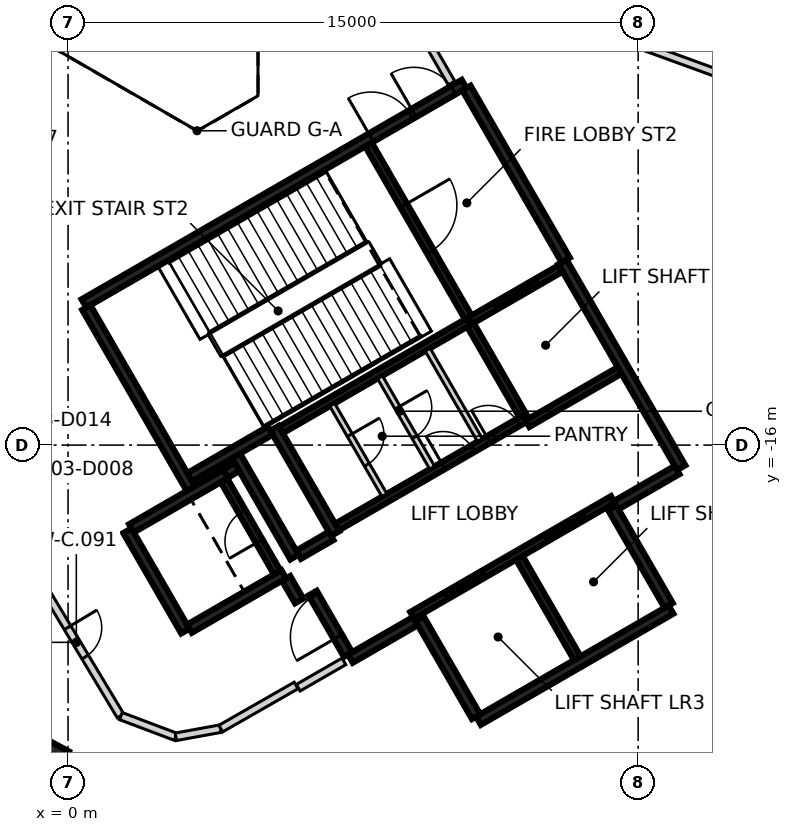
"""IFC4 building model, lengths in metres.
Left out: names, types, materials, properties, quantities, classifications, styles, units other than length and angle.
Written with IfcOpenShell. Run it as: python <this file> out.ifc"""

import sys

from ifc_helpers import new_model, si_unit, direction, frame, frame_2d, origin, origin_2d, place, context, subcontext, project, spatial, rectangle, extrude, element, fill, save


model = new_model("IFC4")
c1 = context("Model", 3, precision=1e-05, world=origin(), true_north=direction((0.0, 1.0)))
c2 = subcontext(c1, "Body", "Model", "MODEL_VIEW")
j1 = project(units=[si_unit("LENGTHUNIT", "METRE"), si_unit("PLANEANGLEUNIT", "RADIAN")], contexts=[c1])
p1 = place(None, origin())
s1 = spatial("IfcSite", under=j1, at=p1, CompositionType="ELEMENT")
p2 = place(p1, origin())
s2 = spatial("IfcBuilding", under=s1, at=p2, CompositionType="ELEMENT")
p3 = place(p2, frame((0.0, 0.0, 19.5)))
s3 = spatial("IfcBuildingStorey", under=s2, at=p3, CompositionType="ELEMENT", Elevation=19.5)
p4 = place(p3, frame((-1.197, -24.423, -0.35), z_axis=(0.0, 0.0, 1.0), x_axis=(0.476198301069, 0.879337920289, 0.0)))
e1 = element("IfcColumn", 1, at=p4, inside=s3, PredefinedType="COLUMN", context=c2, shape_type="SweptSolid", body=[
    extrude(rectangle(XDim=1.8, YDim=1.8, at=origin_2d()), origin(), (0.0, 0.0, 1.0), 2.5),
])
p5 = place(p3, frame((0.417, -12.273, 0.0), z_axis=(0.0, 0.0, 1.0), x_axis=(0.866021906294, 0.500006057782, 0.0)))
e2 = element("IfcWall", 2, at=p5, inside=s3, PredefinedType="SHEAR", context=c2, shape_type="SweptSolid", body=[
    extrude(rectangle(XDim=11.55, YDim=0.25, at=frame_2d((5.775, 0.0))), origin(), (0.0, 0.0, 1.0), 4.55),
])
p6 = place(p5, frame((10.025, 0.0, 0.0)))
e3 = element("IfcOpeningElement", 3, at=p6, cuts=e2, PredefinedType="OPENING", context=c2, shape_type="SweptSolid", body=[
    extrude(rectangle(XDim=1.2, YDim=2.1, at=frame_2d((0.6, 1.05))), frame((0.0, 0.135, 0.0), z_axis=(0.0, -1.0, 0.0), x_axis=(1.0, 0.0, 0.0)), (0.0, 0.0, 1.0), 0.27),
])
p7 = place(p5, frame((8.725, 0.0, 0.0)))
e4 = element("IfcOpeningElement", 4, at=p7, cuts=e2, PredefinedType="OPENING", context=c2, shape_type="SweptSolid", body=[
    extrude(rectangle(XDim=1.2, YDim=2.1, at=frame_2d((0.6, 1.05))), frame((0.0, 0.135, 0.0), z_axis=(0.0, -1.0, 0.0), x_axis=(1.0, 0.0, 0.0)), (0.0, 0.0, 1.0), 0.27),
])
p8 = place(p3, frame((13.008, -11.181, 0.0), z_axis=(0.0, 0.0, 1.0), x_axis=(0.500004234368, -0.866022959057, 0.0)))
e5 = element("IfcWall", 5, at=p8, inside=s3, PredefinedType="SHEAR", context=c2, shape_type="SweptSolid", body=[
    extrude(rectangle(XDim=6.25, YDim=0.25, at=frame_2d((3.125, 0.0))), origin(), (0.0, 0.0, 1.0), 4.55),
])
p9 = place(p3, frame((15.865, -20.328, 0.0), z_axis=(0.0, 0.0, 1.0), x_axis=(-0.86602852612, -0.499994591916, 0.0)))
e6 = element("IfcWall", 6, at=p9, inside=s3, PredefinedType="SHEAR", context=c2, shape_type="SweptSolid", body=[
    extrude(rectangle(XDim=5.85, YDim=0.25, at=frame_2d((2.925, 0.0))), origin(), (0.0, 0.0, 1.0), 4.55),
])
p10 = place(p3, frame((3.235, -17.153, 0.0), z_axis=(0.0, 0.0, 1.0), x_axis=(-0.500008851346, 0.866020293397, 0.0)))
e7 = element("IfcWall", 7, at=p10, inside=s3, PredefinedType="SHEAR", context=c2, shape_type="SweptSolid", body=[
    extrude(rectangle(XDim=5.51, YDim=0.25, at=frame_2d((2.755, 0.0))), origin(), (0.0, 0.0, 1.0), 4.55),
])
p11 = place(p3, frame((10.483, -6.606, 0.0), z_axis=(0.0, 0.0, 1.0), x_axis=(0.49999885962, -0.866026062182, 0.0)))
e8 = element("IfcWall", 8, at=p11, inside=s3, PredefinedType="SHEAR", context=c2, shape_type="SweptSolid", body=[
    extrude(rectangle(XDim=5.225, YDim=0.25, at=frame_2d((2.612, 0.0))), origin(), (0.0, 0.0, 1.0), 4.55),
])
p12 = place(p3, frame((7.031, -18.327, 0.0), z_axis=(0.0, 0.0, 1.0), x_axis=(-0.499971222258, 0.866042017984, 0.0)))
e9 = element("IfcWall", 9, at=p12, inside=s3, PredefinedType="SHEAR", context=c2, shape_type="SweptSolid", body=[
    extrude(rectangle(XDim=3.2, YDim=0.25, at=frame_2d((1.6, 0.0))), origin(), (0.0, 0.0, 1.0), 4.55),
])
for number, where, z_axis, x_axis in (
    (10, (14.315, -17.644, 0.0), (0.0, 0.0, 1.0), (0.5, -0.866, 0.0)),
    (11, (10.736, -23.145, 0.0), (0.0, 0.0, 1.0), (-0.5, 0.866, 0.0)),
):
    element("IfcWall", number, at=place(p3, frame(where, z_axis=z_axis, x_axis=x_axis)), inside=s3, PredefinedType="SHEAR", context=c2, shape_type="SweptSolid", body=[
        extrude(rectangle(XDim=2.974, YDim=0.25, at=frame_2d((1.487, 0.0))), origin(), (0.0, 0.0, 1.0), 4.55),
    ])
p13 = place(p3, frame((3.085, -20.894, 0.0), z_axis=(0.0, 0.0, 1.0), x_axis=(-0.499978833458, 0.866037623948, 0.0)))
e12 = element("IfcWall", 12, at=p13, inside=s3, PredefinedType="SHEAR", context=c2, shape_type="SweptSolid", body=[
    extrude(rectangle(XDim=3.05, YDim=0.25, at=frame_2d((1.525, 0.0))), origin(), (0.0, 0.0, 1.0), 4.55),
])
p14 = place(p3, frame((1.669, -18.19, 0.0), z_axis=(0.0, 0.0, 1.0), x_axis=(0.866042235819, 0.499970844928, 0.0)))
e13 = element("IfcWall", 13, at=p14, inside=s3, PredefinedType="SHEAR", context=c2, shape_type="SweptSolid", body=[
    extrude(rectangle(XDim=2.865, YDim=0.25, at=frame_2d((1.432, 0.0))), origin(), (0.0, 0.0, 1.0), 4.55),
])
p15 = place(p3, frame((5.675, -19.399, 0.0), z_axis=(0.0, 0.0, 1.0), x_axis=(-0.866026637627, -0.499997862916, 0.0)))
e14 = element("IfcWall", 14, at=p15, inside=s3, PredefinedType="SHEAR", context=c2, shape_type="SweptSolid", body=[
    extrude(rectangle(XDim=2.865, YDim=0.25, at=frame_2d((1.432, 0.0))), origin(), (0.0, 0.0, 1.0), 4.55),
])
p16 = place(p3, frame((4.414, -16.276, 0.0), z_axis=(0.0, 0.0, 1.0), x_axis=(0.500003324108, -0.866023484601, 0.0)))
e15 = element("IfcWall", 15, at=p16, inside=s3, PredefinedType="SHEAR", context=c2, shape_type="SweptSolid", body=[
    extrude(rectangle(XDim=3.085, YDim=0.25, at=frame_2d((1.542, 0.0))), origin(), (0.0, 0.0, 1.0), 4.55),
])
p17 = place(p3, frame((5.322, -15.619, 0.0), z_axis=(0.0, 0.0, 1.0), x_axis=(-0.866026229868, -0.499998569178, 0.0)))
e16 = element("IfcWall", 16, at=p17, inside=s3, PredefinedType="SHEAR", context=c2, shape_type="SweptSolid", body=[
    extrude(rectangle(XDim=2.449, YDim=0.25, at=frame_2d((1.225, 0.0))), origin(), (0.0, 0.0, 1.0), 4.55),
])
p18 = place(p3, frame((9.14, -20.631, 0.0), z_axis=(0.0, 0.0, 1.0), x_axis=(-0.866043531843, -0.499968599967, 0.0)))
e17 = element("IfcWall", 17, at=p18, inside=s3, PredefinedType="SHEAR", context=c2, shape_type="SweptSolid", body=[
    extrude(rectangle(XDim=1.975, YDim=0.25, at=frame_2d((0.987, 0.0))), origin(), (0.0, 0.0, 1.0), 4.55),
])
p19 = place(p3, frame((16.025, -16.656, 0.0), z_axis=(0.0, 0.0, 1.0), x_axis=(-0.866016279763, -0.500015802937, 0.0)))
e18 = element("IfcWall", 18, at=p19, inside=s3, PredefinedType="SHEAR", context=c2, shape_type="SweptSolid", body=[
    extrude(rectangle(XDim=1.849, YDim=0.25, at=frame_2d((0.925, 0.0))), origin(), (0.0, 0.0, 1.0), 4.55),
])
p20 = place(p3, frame((7.367, -21.51, 0.0), z_axis=(0.0, 0.0, 1.0), x_axis=(-0.499983108224, 0.866035156036, 0.0)))
e19 = element("IfcWall", 19, at=p20, inside=s3, PredefinedType="SHEAR", context=c2, shape_type="SweptSolid", body=[
    extrude(rectangle(XDim=1.865, YDim=0.25, at=frame_2d((0.932, 0.0))), origin(), (0.0, 0.0, 1.0), 4.55),
])
p21 = place(p20, frame((0.535, 0.0, 0.0)))
e20 = element("IfcOpeningElement", 20, at=p21, cuts=e19, PredefinedType="OPENING", context=c2, shape_type="SweptSolid", body=[
    extrude(rectangle(XDim=1.25, YDim=2.1, at=frame_2d((0.625, 1.05))), frame((0.0, 0.135, 0.0), z_axis=(0.0, -1.0, 0.0), x_axis=(1.0, 0.0, 0.0)), (0.0, 0.0, 1.0), 0.27),
])
p22 = place(p3, frame((6.065, -18.885, 0.0), z_axis=(0.0, 0.0, 1.0), x_axis=(0.866017078145, 0.500014420154, 0.0)))
e21 = element("IfcWall", 21, at=p22, inside=s3, PredefinedType="SHEAR", context=c2, shape_type="SweptSolid", body=[
    extrude(rectangle(XDim=0.989, YDim=0.25, at=frame_2d((0.495, 0.0))), origin(), (0.0, 0.0, 1.0), 4.55),
])
p23 = place(p3, frame((6.08, -20.1, 0.0), z_axis=(0.0, 0.0, 1.0), x_axis=(-0.500051773299, 0.865995510393, 0.0)))
e22 = element("IfcWall", 22, at=p23, inside=s3, PredefinedType="SHEAR", context=c2, shape_type="SweptSolid", body=[
    extrude(rectangle(XDim=0.685, YDim=0.25, at=frame_2d((0.342, 0.0))), origin(), (0.0, 0.0, 1.0), 4.55),
])
p24 = place(p3, frame((4.145, -16.749, 0.0), z_axis=(0.0, 0.0, 1.0), x_axis=(0.866185586049, 0.49972245349, 0.0)))
e23 = element("IfcWall", 23, at=p24, inside=s3, PredefinedType="SHEAR", context=c2, shape_type="SweptSolid", body=[
    extrude(rectangle(XDim=0.344, YDim=0.25, at=frame_2d((0.172, 0.0))), origin(), (0.0, 0.0, 1.0), 4.55),
])
p25 = place(p3, frame((9.052, -20.48, 0.0), z_axis=(0.0, 0.0, 1.0), x_axis=(0.866030299012, 0.499991521122, 0.0)))
e24 = element("IfcWall", 24, at=p25, inside=s3, PredefinedType="SHEAR", context=c2, shape_type="SweptSolid", body=[
    extrude(rectangle(XDim=6.1, YDim=0.2, at=frame_2d((3.05, 0.0))), origin(), (0.0, 0.0, 1.0), 4.55),
])
p26 = place(p25, frame((1.0, 0.0, 0.0)))
e25 = element("IfcOpeningElement", 25, at=p26, cuts=e24, PredefinedType="OPENING", context=c2, shape_type="SweptSolid", body=[
    extrude(rectangle(XDim=1.2, YDim=2.1, at=frame_2d((0.6, 1.05))), frame((0.0, 0.11, 0.0), z_axis=(0.0, -1.0, 0.0), x_axis=(1.0, 0.0, 0.0)), (0.0, 0.0, 1.0), 0.22),
])
p27 = place(p25, frame((4.05, 0.0, 0.0)))
e26 = element("IfcOpeningElement", 26, at=p27, cuts=e24, PredefinedType="OPENING", context=c2, shape_type="SweptSolid", body=[
    extrude(rectangle(XDim=1.2, YDim=2.1, at=frame_2d((0.6, 1.05))), frame((0.0, 0.11, 0.0), z_axis=(0.0, -1.0, 0.0), x_axis=(1.0, 0.0, 0.0)), (0.0, 0.0, 1.0), 0.22),
])
p28 = place(p3, frame((10.538, -12.752, 0.0), z_axis=(0.0, 0.0, 1.0), x_axis=(-0.866038630372, -0.499977090179, 0.0)))
e27 = element("IfcWall", 27, at=p28, inside=s3, PredefinedType="SHEAR", context=c2, shape_type="SweptSolid", body=[
    extrude(rectangle(XDim=5.699, YDim=0.2, at=frame_2d((2.85, 0.0))), origin(), (0.0, 0.0, 1.0), 4.55),
])
p29 = place(p3, frame((7.077, -18.156, 0.0), z_axis=(0.0, 0.0, 1.0), x_axis=(0.866038630372, 0.499977090179, 0.0)))
e28 = element("IfcWall", 28, at=p29, inside=s3, PredefinedType="SHEAR", context=c2, shape_type="SweptSolid", body=[
    extrude(rectangle(XDim=5.699, YDim=0.2, at=frame_2d((2.85, 0.0))), origin(), (0.0, 0.0, 1.0), 4.55),
])
p30 = place(p29, frame((3.224, 0.0, 0.0)))
e29 = element("IfcOpeningElement", 29, at=p30, cuts=e28, PredefinedType="OPENING", context=c2, shape_type="SweptSolid", body=[
    extrude(rectangle(XDim=0.9, YDim=2.1, at=frame_2d((0.45, 1.05))), frame((0.0, 0.11, 0.0), z_axis=(0.0, -1.0, 0.0), x_axis=(1.0, 0.0, 0.0)), (0.0, 0.0, 1.0), 0.22),
])
p31 = place(p29, frame((4.599, 0.0, 0.0)))
e30 = element("IfcOpeningElement", 30, at=p31, cuts=e28, PredefinedType="OPENING", context=c2, shape_type="SweptSolid", body=[
    extrude(rectangle(XDim=0.9, YDim=2.1, at=frame_2d((0.45, 1.05))), frame((0.0, 0.11, 0.0), z_axis=(0.0, -1.0, 0.0), x_axis=(1.0, 0.0, 0.0)), (0.0, 0.0, 1.0), 0.22),
])
p32 = place(p3, frame((7.906, -8.094, 0.0), z_axis=(0.0, 0.0, 1.0), x_axis=(0.500024287448, -0.866011380966, 0.0)))
e31 = element("IfcWall", 31, at=p32, inside=s3, PredefinedType="SHEAR", context=c2, shape_type="SweptSolid", body=[
    extrude(rectangle(XDim=5.251, YDim=0.2, at=frame_2d((2.625, 0.0))), origin(), (0.0, 0.0, 1.0), 4.55),
])
p33 = place(p32, frame((1.849, 0.0, 0.0)))
e32 = element("IfcOpeningElement", 32, at=p33, cuts=e31, PredefinedType="OPENING", context=c2, shape_type="SweptSolid", body=[
    extrude(rectangle(XDim=1.4, YDim=2.1, at=frame_2d((0.7, 1.05))), frame((0.0, 0.11, 0.0), z_axis=(0.0, -1.0, 0.0), x_axis=(1.0, 0.0, 0.0)), (0.0, 0.0, 1.0), 0.22),
])
p34 = place(p3, frame((11.875, -18.967, 0.0), z_axis=(0.0, 0.0, 1.0), x_axis=(0.49998131003, -0.866036194175, 0.0)))
e33 = element("IfcWall", 33, at=p34, inside=s3, PredefinedType="SHEAR", context=c2, shape_type="SweptSolid", body=[
    extrude(rectangle(XDim=3.048, YDim=0.2, at=frame_2d((1.524, 0.0))), origin(), (0.0, 0.0, 1.0), 4.55),
])
p35 = place(p3, frame((5.503, -19.352, 0.0), z_axis=(0.0, 0.0, 1.0), x_axis=(-0.499986818241, 0.866033014143, 0.0)))
e34 = element("IfcWall", 34, at=p35, inside=s3, PredefinedType="SHEAR", context=c2, shape_type="SweptSolid", body=[
    extrude(rectangle(XDim=2.798, YDim=0.2, at=frame_2d((1.399, 0.0))), origin(), (0.0, 0.0, 1.0), 4.55),
])
p36 = place(p35, frame((0.949, 0.0, 0.0)))
e35 = element("IfcOpeningElement", 35, at=p36, cuts=e34, PredefinedType="OPENING", context=c2, shape_type="SweptSolid", body=[
    extrude(rectangle(XDim=0.9, YDim=2.1, at=frame_2d((0.45, 1.05))), frame((0.0, 0.11, 0.0), z_axis=(0.0, -1.0, 0.0), x_axis=(1.0, 0.0, 0.0)), (0.0, 0.0, 1.0), 0.22),
])
p37 = place(p3, frame((11.963, -15.22, 0.0), z_axis=(0.0, 0.0, 1.0), x_axis=(-0.500034990121, 0.866005201286, 0.0)))
e36 = element("IfcWall", 36, at=p37, inside=s3, PredefinedType="SHEAR", context=c2, shape_type="SweptSolid", body=[
    extrude(rectangle(XDim=2.75, YDim=0.2, at=frame_2d((1.375, 0.0))), origin(), (0.0, 0.0, 1.0), 4.55),
])
p38 = place(p3, frame((10.587, -12.723, 0.0), z_axis=(0.0, 0.0, 1.0), x_axis=(0.866037306777, 0.499979382845, 0.0)))
e37 = element("IfcWall", 37, at=p38, inside=s3, PredefinedType="SHEAR", context=c2, shape_type="SweptSolid", body=[
    extrude(rectangle(XDim=2.742, YDim=0.2, at=frame_2d((1.371, 0.0))), origin(), (0.0, 0.0, 1.0), 4.55),
])
p39 = place(p38, frame((0.743, 0.0, 0.0)))
e38 = element("IfcOpeningElement", 38, at=p39, cuts=e37, PredefinedType="OPENING", context=c2, shape_type="SweptSolid", body=[
    extrude(rectangle(XDim=1.3, YDim=2.1, at=frame_2d((0.65, 1.05))), frame((0.0, 0.11, 0.0), z_axis=(0.0, -1.0, 0.0), x_axis=(1.0, 0.0, 0.0)), (0.0, 0.0, 1.0), 0.22),
])
p40 = place(p3, frame((14.512, -14.037, 0.0), z_axis=(0.0, 0.0, 1.0), x_axis=(-0.866044696403, -0.499966582715, 0.0)))
e39 = element("IfcWall", 39, at=p40, inside=s3, PredefinedType="SHEAR", context=c2, shape_type="SweptSolid", body=[
    extrude(rectangle(XDim=2.799, YDim=0.2, at=frame_2d((1.399, 0.0))), origin(), (0.0, 0.0, 1.0), 4.55),
])
p41 = place(p3, frame((8.207, -14.214, 0.0), z_axis=(0.0, 0.0, 1.0), x_axis=(0.50002746344, -0.86600954718, 0.0)))
e40 = element("IfcWall", 40, at=p41, inside=s3, PredefinedType="PARTITIONING", context=c2, shape_type="SweptSolid", body=[
    extrude(rectangle(XDim=2.748, YDim=0.15, at=frame_2d((1.374, 0.0))), origin(), (0.0, 0.0, 1.0), 4.55),
])
p42 = place(p41, frame((0.924, 0.0, 0.0)))
e41 = element("IfcOpeningElement", 41, at=p42, cuts=e40, PredefinedType="OPENING", context=c2, shape_type="SweptSolid", body=[
    extrude(rectangle(XDim=0.9, YDim=2.1, at=frame_2d((0.45, 1.05))), frame((0.0, 0.085, 0.0), z_axis=(0.0, -1.0, 0.0), x_axis=(1.0, 0.0, 0.0)), (0.0, 0.0, 1.0), 0.17),
])
p43 = place(p3, frame((9.462, -13.489, 0.0), z_axis=(0.0, 0.0, 1.0), x_axis=(0.499988999718, -0.866031754707, 0.0)))
e42 = element("IfcWall", 42, at=p43, inside=s3, PredefinedType="PARTITIONING", context=c2, shape_type="SweptSolid", body=[
    extrude(rectangle(XDim=2.749, YDim=0.15, at=frame_2d((1.374, 0.0))), origin(), (0.0, 0.0, 1.0), 4.55),
])
p44 = place(p3, frame((6.951, -14.939, 0.0), z_axis=(0.0, 0.0, 1.0), x_axis=(0.499988999718, -0.866031754707, 0.0)))
e43 = element("IfcWall", 43, at=p44, inside=s3, PredefinedType="PARTITIONING", context=c2, shape_type="SweptSolid", body=[
    extrude(rectangle(XDim=2.749, YDim=0.15, at=frame_2d((1.374, 0.0))), origin(), (0.0, 0.0, 1.0), 4.55),
])
p45 = place(p44, frame((0.924, 0.0, 0.0)))
e44 = element("IfcOpeningElement", 44, at=p45, cuts=e43, PredefinedType="OPENING", context=c2, shape_type="SweptSolid", body=[
    extrude(rectangle(XDim=0.9, YDim=2.1, at=frame_2d((0.45, 1.05))), frame((0.0, 0.085, 0.0), z_axis=(0.0, -1.0, 0.0), x_axis=(1.0, 0.0, 0.0)), (0.0, 0.0, 1.0), 0.17),
])
p46 = place(p3, frame((-0.946, -19.254, 0.0), z_axis=(0.0, 0.0, 1.0), x_axis=(0.515131406019, -0.857111214798, 0.0)))
e45 = element("IfcWall", 45, at=p46, inside=s3, PredefinedType="PARTITIONING", context=c2, shape_type="SweptSolid", body=[
    extrude(rectangle(XDim=4.518, YDim=0.2, at=frame_2d((2.259, 0.0))), origin(), (0.0, 0.0, 1.0), 4.55),
])
p47 = place(p46, frame((1.809, 0.0, 0.0)))
e46 = element("IfcOpeningElement", 46, at=p47, cuts=e45, PredefinedType="OPENING", context=c2, shape_type="SweptSolid", body=[
    extrude(rectangle(XDim=0.9, YDim=2.1, at=frame_2d((0.45, 1.05))), frame((0.0, 0.11, 0.0), z_axis=(0.0, -1.0, 0.0), x_axis=(1.0, 0.0, 0.0)), (0.0, 0.0, 1.0), 0.22),
])
p48 = place(p3, frame((1.39, -23.131, 0.0), z_axis=(0.0, 0.0, 1.0), x_axis=(0.935656991295, -0.352910745997, 0.0)))
e47 = element("IfcWall", 47, at=p48, inside=s3, PredefinedType="PARTITIONING", context=c2, shape_type="SweptSolid", body=[
    extrude(rectangle(XDim=1.541, YDim=0.2, at=frame_2d((0.771, 0.0))), origin(), (0.0, 0.0, 1.0), 4.55),
])
p49 = place(p3, frame((2.837, -23.675, 0.0), z_axis=(0.0, 0.0, 1.0), x_axis=(0.983774851332, 0.179407474447, 0.0)))
e48 = element("IfcWall", 48, at=p49, inside=s3, PredefinedType="PARTITIONING", context=c2, shape_type="SweptSolid", body=[
    extrude(rectangle(XDim=1.193, YDim=0.2, at=frame_2d((0.597, 0.0))), origin(), (0.0, 0.0, 1.0), 4.55),
])
p50 = place(p3, frame((4.019, -23.459, 0.0), z_axis=(0.0, 0.0, 1.0), x_axis=(0.86785453754, 0.496818378959, 0.0)))
e49 = element("IfcWall", 49, at=p50, inside=s3, PredefinedType="PARTITIONING", context=c2, shape_type="SweptSolid", body=[
    extrude(rectangle(XDim=2.282, YDim=0.2, at=frame_2d((1.141, 0.0))), origin(), (0.0, 0.0, 1.0), 4.55),
])
p51 = place(p3, frame((6.056, -22.384, 0.0), z_axis=(0.0, 0.0, 1.0), x_axis=(0.866396419095, 0.499356831314, 0.0)))
e50 = element("IfcWall", 50, at=p51, inside=s3, PredefinedType="PARTITIONING", context=c2, shape_type="SweptSolid", body=[
    extrude(rectangle(XDim=1.387, YDim=0.2, at=frame_2d((0.694, 0.0))), origin(), (0.0, 0.0, 1.0), 4.55),
])
p52 = place(p3, frame((9.101, -4.763, 0.0), z_axis=(0.0, 0.0, 1.0), x_axis=(0.500150029396, -0.865938766944, 0.0)))
e51 = element("IfcWall", 51, at=p52, inside=s3, PredefinedType="PARTITIONING", context=c2, shape_type="SweptSolid", body=[
    extrude(rectangle(XDim=1.977, YDim=0.2, at=frame_2d((0.989, 0.0))), origin(), (0.0, 0.0, 1.0), 4.55),
])
p53 = place(p3, frame((9.003, -3.276, 0.0), z_axis=(0.0, 0.0, 1.0), x_axis=(0.93968653248, -0.342036870345, 0.0)))
e52 = element("IfcWall", 52, at=p53, inside=s3, PredefinedType="PARTITIONING", context=c2, shape_type="SweptSolid", body=[
    extrude(rectangle(XDim=19.147, YDim=0.2, at=frame_2d((9.574, 0.0))), origin(), (0.0, 0.0, 1.0), 2.15),
])
p54 = place(p39, origin())
e53 = element("IfcDoor", 53, at=p54, inside=s3, OperationType="SLIDING_TO_LEFT", PredefinedType="DOOR", context=c2, shape_type="SweptSolid", body=[
    extrude(rectangle(XDim=1.3, YDim=2.1, at=frame_2d((0.65, 1.05))), frame((0.0, 0.025, 0.0), z_axis=(0.0, -1.0, 0.0), x_axis=(1.0, 0.0, 0.0)), (0.0, 0.0, 1.0), 0.05),
])
fill(e38, e53)
p55 = place(p26, origin())
e54 = element("IfcDoor", 54, at=p55, inside=s3, OperationType="DOUBLE_DOOR_SLIDING", PredefinedType="DOOR", context=c2, shape_type="SweptSolid", body=[
    extrude(rectangle(XDim=1.2, YDim=2.1, at=frame_2d((0.6, 1.05))), frame((0.0, 0.025, 0.0), z_axis=(0.0, -1.0, 0.0), x_axis=(1.0, 0.0, 0.0)), (0.0, 0.0, 1.0), 0.05),
])
fill(e25, e54)
p56 = place(p27, origin())
e55 = element("IfcDoor", 55, at=p56, inside=s3, OperationType="DOUBLE_DOOR_SLIDING", PredefinedType="DOOR", context=c2, shape_type="SweptSolid", body=[
    extrude(rectangle(XDim=1.2, YDim=2.1, at=frame_2d((0.6, 1.05))), frame((0.0, 0.025, 0.0), z_axis=(0.0, -1.0, 0.0), x_axis=(1.0, 0.0, 0.0)), (0.0, 0.0, 1.0), 0.05),
])
fill(e26, e55)
p57 = place(p21, origin())
e56 = element("IfcDoor", 56, at=p57, inside=s3, OperationType="SINGLE_SWING_LEFT", PredefinedType="DOOR", context=c2, shape_type="SweptSolid", body=[
    extrude(rectangle(XDim=1.25, YDim=2.1, at=frame_2d((0.625, 1.05))), frame((0.0, 0.025, 0.0), z_axis=(0.0, -1.0, 0.0), x_axis=(1.0, 0.0, 0.0)), (0.0, 0.0, 1.0), 0.05),
])
fill(e20, e56)
p58 = place(p6, origin())
e57 = element("IfcDoor", 57, at=p58, inside=s3, OperationType="SINGLE_SWING_LEFT", PredefinedType="DOOR", context=c2, shape_type="SweptSolid", body=[
    extrude(rectangle(XDim=1.2, YDim=2.1, at=frame_2d((0.6, 1.05))), frame((0.0, 0.025, 0.0), z_axis=(0.0, -1.0, 0.0), x_axis=(1.0, 0.0, 0.0)), (0.0, 0.0, 1.0), 0.05),
])
fill(e3, e57)
p59 = place(p7, origin())
e58 = element("IfcDoor", 58, at=p59, inside=s3, OperationType="SINGLE_SWING_RIGHT", PredefinedType="DOOR", context=c2, shape_type="SweptSolid", body=[
    extrude(rectangle(XDim=1.2, YDim=2.1, at=frame_2d((0.6, 1.05))), frame((0.0, 0.025, 0.0), z_axis=(0.0, -1.0, 0.0), x_axis=(1.0, 0.0, 0.0)), (0.0, 0.0, 1.0), 0.05),
])
fill(e4, e58)
p60 = place(p33, origin())
e59 = element("IfcDoor", 59, at=p60, inside=s3, OperationType="SINGLE_SWING_LEFT", PredefinedType="DOOR", context=c2, shape_type="SweptSolid", body=[
    extrude(rectangle(XDim=1.4, YDim=2.1, at=frame_2d((0.7, 1.05))), frame((0.0, 0.025, 0.0), z_axis=(0.0, -1.0, 0.0), x_axis=(1.0, 0.0, 0.0)), (0.0, 0.0, 1.0), 0.05),
])
fill(e32, e59)
p61 = place(p30, origin())
e60 = element("IfcDoor", 60, at=p61, inside=s3, OperationType="SINGLE_SWING_RIGHT", PredefinedType="DOOR", context=c2, shape_type="SweptSolid", body=[
    extrude(rectangle(XDim=0.9, YDim=2.1, at=frame_2d((0.45, 1.05))), frame((0.0, 0.025, 0.0), z_axis=(0.0, -1.0, 0.0), x_axis=(1.0, 0.0, 0.0)), (0.0, 0.0, 1.0), 0.05),
])
fill(e29, e60)
p62 = place(p31, origin())
e61 = element("IfcDoor", 61, at=p62, inside=s3, OperationType="SINGLE_SWING_LEFT", PredefinedType="DOOR", context=c2, shape_type="SweptSolid", body=[
    extrude(rectangle(XDim=0.9, YDim=2.1, at=frame_2d((0.45, 1.05))), frame((0.0, 0.025, 0.0), z_axis=(0.0, -1.0, 0.0), x_axis=(1.0, 0.0, 0.0)), (0.0, 0.0, 1.0), 0.05),
])
fill(e30, e61)
p63 = place(p36, origin())
e62 = element("IfcDoor", 62, at=p63, inside=s3, OperationType="SINGLE_SWING_RIGHT", PredefinedType="DOOR", context=c2, shape_type="SweptSolid", body=[
    extrude(rectangle(XDim=0.9, YDim=2.1, at=frame_2d((0.45, 1.05))), frame((0.0, 0.025, 0.0), z_axis=(0.0, -1.0, 0.0), x_axis=(1.0, 0.0, 0.0)), (0.0, 0.0, 1.0), 0.05),
])
fill(e35, e62)
p64 = place(p42, origin())
e63 = element("IfcDoor", 63, at=p64, inside=s3, OperationType="SINGLE_SWING_LEFT", PredefinedType="DOOR", context=c2, shape_type="SweptSolid", body=[
    extrude(rectangle(XDim=0.9, YDim=2.1, at=frame_2d((0.45, 1.05))), frame((0.0, 0.025, 0.0), z_axis=(0.0, -1.0, 0.0), x_axis=(1.0, 0.0, 0.0)), (0.0, 0.0, 1.0), 0.05),
])
fill(e41, e63)
p65 = place(p45, origin())
e64 = element("IfcDoor", 64, at=p65, inside=s3, OperationType="SINGLE_SWING_RIGHT", PredefinedType="DOOR", context=c2, shape_type="SweptSolid", body=[
    extrude(rectangle(XDim=0.9, YDim=2.1, at=frame_2d((0.45, 1.05))), frame((0.0, 0.025, 0.0), z_axis=(0.0, -1.0, 0.0), x_axis=(1.0, 0.0, 0.0)), (0.0, 0.0, 1.0), 0.05),
])
fill(e44, e64)
p66 = place(p47, origin())
e65 = element("IfcDoor", 65, at=p66, inside=s3, OperationType="SINGLE_SWING_LEFT", PredefinedType="DOOR", context=c2, shape_type="SweptSolid", body=[
    extrude(rectangle(XDim=0.9, YDim=2.1, at=frame_2d((0.45, 1.05))), frame((0.0, 0.025, 0.0), z_axis=(0.0, -1.0, 0.0), x_axis=(1.0, 0.0, 0.0)), (0.0, 0.0, 1.0), 0.05),
])
fill(e46, e65)
save(model, sys.argv[1])
